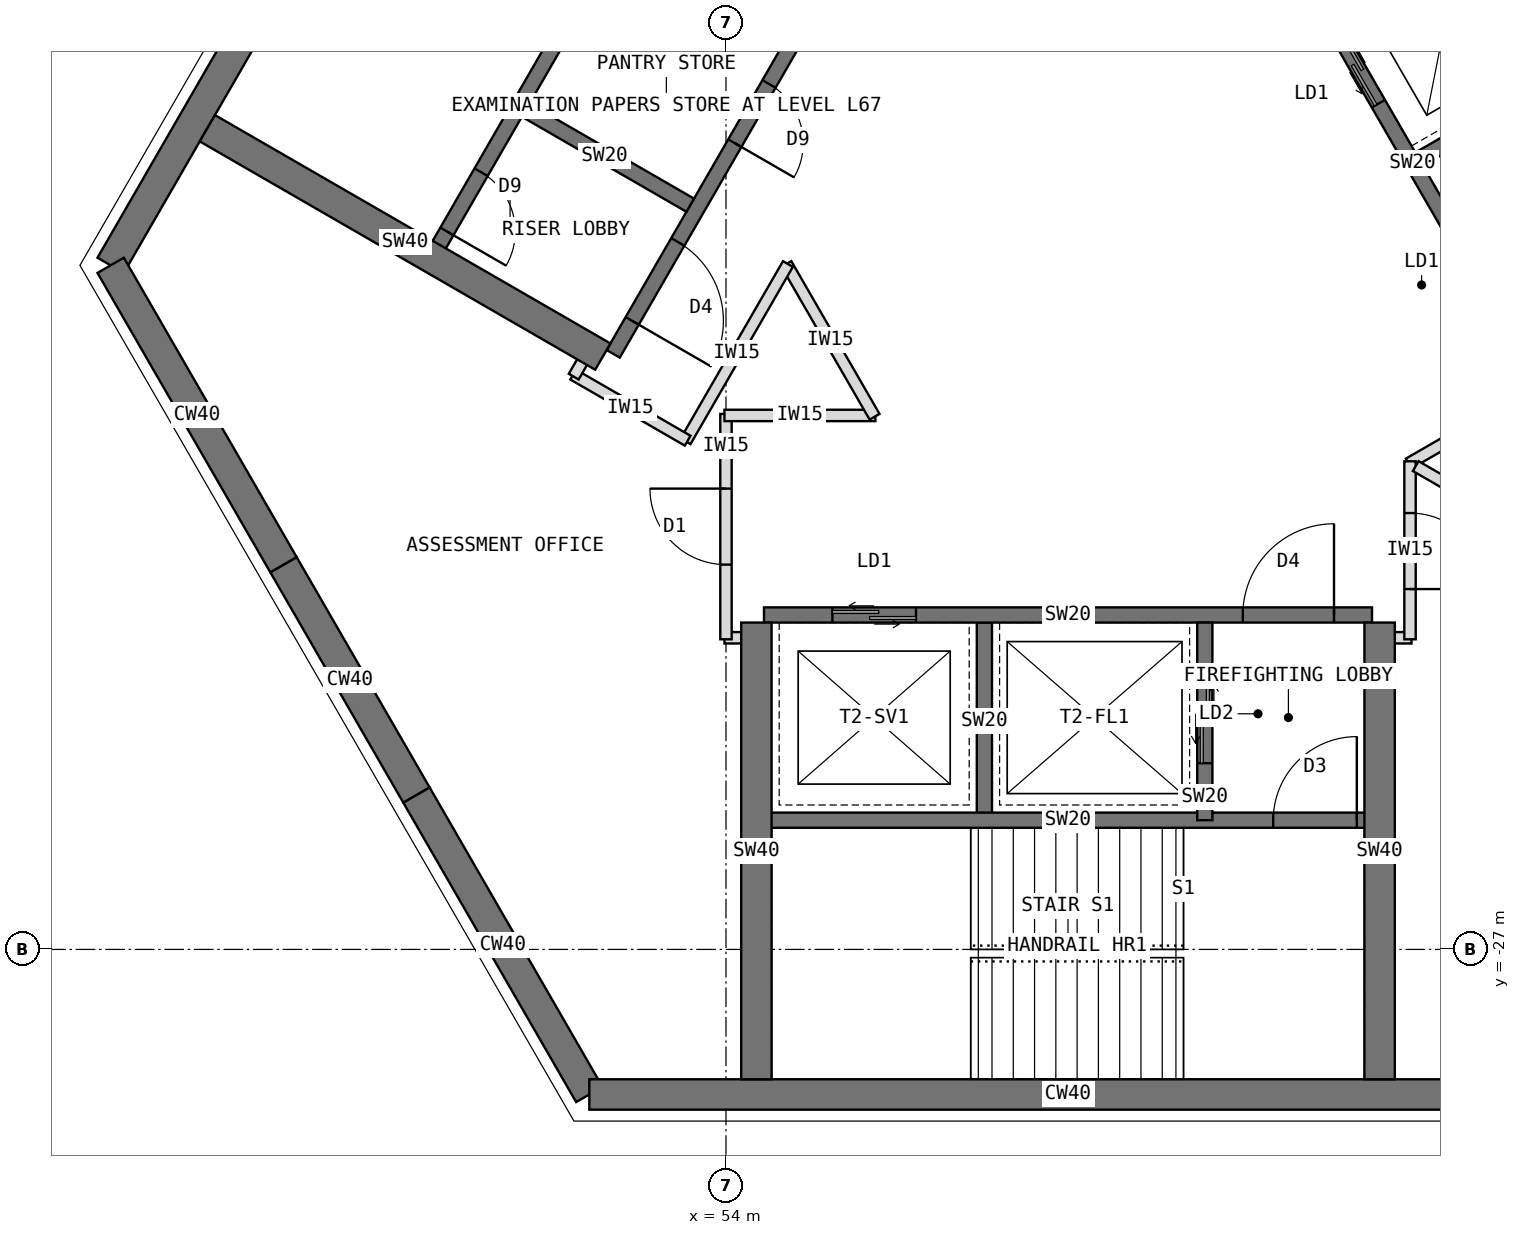
"""IFC4 building model, lengths in metres.
Left out: names, types, materials, properties, quantities, classifications, styles, units other than length and angle.
Written with IfcOpenShell. Run it as: python <this file> out.ifc"""

import sys

from ifc_helpers import new_model, si_unit, direction, frame, frame_2d, origin, place, context, subcontext, project, spatial, rectangle, extrude, element, fill, save


model = new_model("IFC4")
c1 = context("Model", 3, precision=1e-05, world=origin(), true_north=direction((0.0, 1.0)))
c2 = subcontext(c1, "Body", "Model", "MODEL_VIEW")
j1 = project(units=[si_unit("LENGTHUNIT", "METRE"), si_unit("PLANEANGLEUNIT", "RADIAN")], contexts=[c1])
p1 = place(None, origin())
s1 = spatial("IfcSite", under=j1, at=p1, CompositionType="ELEMENT")
p2 = place(p1, origin())
s2 = spatial("IfcBuilding", under=s1, at=p2, CompositionType="ELEMENT")
p3 = place(p2, frame((0.0, 0.0, 267.5)))
s3 = spatial("IfcBuildingStorey", under=s2, at=p3, CompositionType="ELEMENT", Elevation=267.5)
p4 = place(p3, frame((52.202, -7.092, 0.0), z_axis=(0.0, 0.0, 1.0), x_axis=(-0.500005998175, -0.866021940709, 0.0)))
e1 = element("IfcWall", 1, at=p4, inside=s3, PredefinedType="SHEAR", context=c2, shape_type="SweptSolid", body=[
    extrude(rectangle(XDim=12.596, YDim=0.4, at=frame_2d((6.298, 0.0))), origin(), (0.0, 0.0, 1.0), 4.0),
])
p5 = place(p3, frame((45.904, -18.0, 0.0), z_axis=(0.0, 0.0, 1.0), x_axis=(0.500024481964, -0.866011268655, 0.0)))
e2 = element("IfcWall", 2, at=p5, inside=s3, PredefinedType="SHEAR", context=c2, shape_type="SweptSolid", body=[
    extrude(rectangle(XDim=4.548, YDim=0.4, at=frame_2d((2.274, 0.0))), origin(), (0.0, 0.0, 1.0), 4.0),
])
p6 = place(p3, frame((48.178, -21.939, 0.0), z_axis=(0.0, 0.0, 1.0), x_axis=(0.500010275428, -0.866019471182, 0.0)))
e3 = element("IfcWall", 3, at=p6, inside=s3, PredefinedType="SHEAR", context=c2, shape_type="SweptSolid", body=[
    extrude(rectangle(XDim=3.5, YDim=0.4, at=frame_2d((1.75, 0.0))), origin(), (0.0, 0.0, 1.0), 4.0),
])
p7 = place(p3, frame((49.928, -24.97, 0.0), z_axis=(0.0, 0.0, 1.0), x_axis=(0.499984222037, -0.866034513004, 0.0)))
e4 = element("IfcWall", 4, at=p7, inside=s3, PredefinedType="SHEAR", context=c2, shape_type="SweptSolid", body=[
    extrude(rectangle(XDim=4.548, YDim=0.4, at=frame_2d((2.274, 0.0))), origin(), (0.0, 0.0, 1.0), 4.0),
])
p8 = place(p3, frame((52.202, -28.908, 0.0), z_axis=(0.0, 0.0, 1.0), x_axis=(1.0, 0.0, 0.0)))
e5 = element("IfcWall", 5, at=p8, inside=s3, PredefinedType="SHEAR", context=c2, shape_type="SweptSolid", body=[
    extrude(rectangle(XDim=12.596, YDim=0.4, at=frame_2d((6.298, 0.0))), origin(), (0.0, 0.0, 1.0), 4.0),
])
p9 = place(p3, frame((56.516, -12.236, 0.0), z_axis=(0.0, 0.0, 1.0), x_axis=(-0.49999894854, -0.866026010844, 0.0)))
e6 = element("IfcWall", 6, at=p9, inside=s3, PredefinedType="SHEAR", context=c2, shape_type="SweptSolid", body=[
    extrude(rectangle(XDim=8.0, YDim=0.2, at=frame_2d((4.0, 0.0))), origin(), (0.0, 0.0, 1.0), 4.0),
])
p10 = place(p9, frame((6.3, 0.0, 0.0)))
e7 = element("IfcOpeningElement", 7, at=p10, cuts=e6, PredefinedType="OPENING", context=c2, shape_type="SweptSolid", body=[
    extrude(rectangle(XDim=1.2, YDim=2.1, at=frame_2d((0.6, 1.05))), frame((0.0, 0.11, 0.0), z_axis=(0.0, -1.0, 0.0), x_axis=(1.0, 0.0, 0.0)), (0.0, 0.0, 1.0), 0.22),
])
p11 = place(p9, frame((1.0, 0.0, 0.0)))
e8 = element("IfcOpeningElement", 8, at=p11, cuts=e6, PredefinedType="OPENING", context=c2, shape_type="SweptSolid", body=[
    extrude(rectangle(XDim=0.9, YDim=2.1, at=frame_2d((0.45, 1.05))), frame((0.0, 0.11, 0.0), z_axis=(0.0, -1.0, 0.0), x_axis=(1.0, 0.0, 0.0)), (0.0, 0.0, 1.0), 0.22),
])
p12 = place(p9, frame((3.9, 0.0, 0.0)))
e9 = element("IfcOpeningElement", 9, at=p12, cuts=e6, PredefinedType="OPENING", context=c2, shape_type="SweptSolid", body=[
    extrude(rectangle(XDim=0.9, YDim=2.1, at=frame_2d((0.45, 1.05))), frame((0.0, 0.11, 0.0), z_axis=(0.0, -1.0, 0.0), x_axis=(1.0, 0.0, 0.0)), (0.0, 0.0, 1.0), 0.22),
])
p13 = place(p3, frame((53.53, -17.209, 0.0), z_axis=(0.0, 0.0, 1.0), x_axis=(-0.866062058628, 0.499936506574, 0.0)))
e10 = element("IfcWall", 10, at=p13, inside=s3, PredefinedType="SHEAR", context=c2, shape_type="SweptSolid", body=[
    extrude(rectangle(XDim=2.6, YDim=0.2, at=frame_2d((1.3, 0.0))), origin(), (0.0, 0.0, 1.0), 4.0),
])
p14 = place(p3, frame((54.178, -10.886, 0.0), z_axis=(0.0, 0.0, 1.0), x_axis=(-0.49999894854, -0.866026010844, 0.0)))
e11 = element("IfcWall", 11, at=p14, inside=s3, PredefinedType="SHEAR", context=c2, shape_type="SweptSolid", body=[
    extrude(rectangle(XDim=8.0, YDim=0.2, at=frame_2d((4.0, 0.0))), origin(), (0.0, 0.0, 1.0), 4.0),
])
p15 = place(p14, frame((6.8, 0.0, 0.0)))
e12 = element("IfcOpeningElement", 12, at=p15, cuts=e11, PredefinedType="OPENING", context=c2, shape_type="SweptSolid", body=[
    extrude(rectangle(XDim=0.9, YDim=2.1, at=frame_2d((0.45, 1.05))), frame((0.0, 0.11, 0.0), z_axis=(0.0, -1.0, 0.0), x_axis=(1.0, 0.0, 0.0)), (0.0, 0.0, 1.0), 0.22),
])
p16 = place(p3, frame((52.38, -19.201, 0.0), z_axis=(0.0, 0.0, 1.0), x_axis=(-0.866026570101, 0.499997979876, 0.0)))
e13 = element("IfcWall", 13, at=p16, inside=s3, PredefinedType="SHEAR", context=c2, shape_type="SweptSolid", body=[
    extrude(rectangle(XDim=6.008, YDim=0.4, at=frame_2d((3.004, 0.0))), origin(), (0.0, 0.0, 1.0), 4.0),
])
p17 = place(p3, frame((54.5, -22.6, 0.0), z_axis=(0.0, 0.0, 1.0), x_axis=(1.0, 0.0, 0.0)))
e14 = element("IfcWall", 14, at=p17, inside=s3, PredefinedType="SHEAR", context=c2, shape_type="SweptSolid", body=[
    extrude(rectangle(XDim=8.0, YDim=0.2, at=frame_2d((4.0, 0.0))), origin(), (0.0, 0.0, 1.0), 4.0),
])
p18 = place(p17, frame((6.3, 0.0, 0.0)))
e15 = element("IfcOpeningElement", 15, at=p18, cuts=e14, PredefinedType="OPENING", context=c2, shape_type="SweptSolid", body=[
    extrude(rectangle(XDim=1.2, YDim=2.1, at=frame_2d((0.6, 1.05))), frame((0.0, 0.11, 0.0), z_axis=(0.0, -1.0, 0.0), x_axis=(1.0, 0.0, 0.0)), (0.0, 0.0, 1.0), 0.22),
])
p19 = place(p17, frame((0.9, 0.0, 0.0)))
e16 = element("IfcOpeningElement", 16, at=p19, cuts=e14, PredefinedType="OPENING", context=c2, shape_type="SweptSolid", body=[
    extrude(rectangle(XDim=1.1, YDim=2.2, at=frame_2d((0.55, 1.1))), frame((0.0, 0.11, 0.0), z_axis=(0.0, -1.0, 0.0), x_axis=(1.0, 0.0, 0.0)), (0.0, 0.0, 1.0), 0.22),
])
p20 = place(p3, frame((57.4, -22.7, 0.0), z_axis=(0.0, 0.0, 1.0), x_axis=(0.0, -1.0, 0.0)))
e17 = element("IfcWall", 17, at=p20, inside=s3, PredefinedType="SHEAR", context=c2, shape_type="SweptSolid", body=[
    extrude(rectangle(XDim=2.6, YDim=0.2, at=frame_2d((1.3, 0.0))), origin(), (0.0, 0.0, 1.0), 4.0),
])
p21 = place(p3, frame((60.3, -22.7, 0.0), z_axis=(0.0, 0.0, 1.0), x_axis=(0.0, -1.0, 0.0)))
e18 = element("IfcWall", 18, at=p21, inside=s3, PredefinedType="SHEAR", context=c2, shape_type="SweptSolid", body=[
    extrude(rectangle(XDim=2.6, YDim=0.2, at=frame_2d((1.3, 0.0))), origin(), (0.0, 0.0, 1.0), 4.0),
])
p22 = place(p21, frame((0.55, 0.0, 0.0)))
e19 = element("IfcOpeningElement", 19, at=p22, cuts=e18, PredefinedType="OPENING", context=c2, shape_type="SweptSolid", body=[
    extrude(rectangle(XDim=1.3, YDim=2.2, at=frame_2d((0.65, 1.1))), frame((0.0, 0.11, 0.0), z_axis=(0.0, -1.0, 0.0), x_axis=(1.0, 0.0, 0.0)), (0.0, 0.0, 1.0), 0.22),
])
p23 = place(p3, frame((54.5, -25.3, 0.0), z_axis=(0.0, 0.0, 1.0), x_axis=(1.0, 0.0, 0.0)))
e20 = element("IfcWall", 20, at=p23, inside=s3, PredefinedType="SHEAR", context=c2, shape_type="SweptSolid", body=[
    extrude(rectangle(XDim=8.0, YDim=0.2, at=frame_2d((4.0, 0.0))), origin(), (0.0, 0.0, 1.0), 4.0),
])
p24 = place(p23, frame((6.7, 0.0, 0.0)))
e21 = element("IfcOpeningElement", 21, at=p24, cuts=e20, PredefinedType="OPENING", context=c2, shape_type="SweptSolid", body=[
    extrude(rectangle(XDim=1.1, YDim=2.1, at=frame_2d((0.55, 1.05))), frame((0.0, 0.11, 0.0), z_axis=(0.0, -1.0, 0.0), x_axis=(1.0, 0.0, 0.0)), (0.0, 0.0, 1.0), 0.22),
])
for number, where, z_axis, x_axis in (
    (22, (62.6, -22.7, 0.0), (0.0, 0.0, 1.0), (0.0, -1.0, 0.0)),
    (23, (54.4, -22.7, 0.0), (0.0, 0.0, 1.0), (0.0, -1.0, 0.0)),
):
    element("IfcWall", number, at=place(p3, frame(where, z_axis=z_axis, x_axis=x_axis)), inside=s3, PredefinedType="SHEAR", context=c2, shape_type="SweptSolid", body=[
        extrude(rectangle(XDim=6.008, YDim=0.4, at=frame_2d((3.004, 0.0))), origin(), (0.0, 0.0, 1.0), 4.0),
    ])
p25 = place(p3, frame((64.484, -19.164, 0.0), z_axis=(0.0, 0.0, 1.0), x_axis=(-0.49999894854, 0.866026010844, 0.0)))
e24 = element("IfcWall", 24, at=p25, inside=s3, PredefinedType="SHEAR", context=c2, shape_type="SweptSolid", body=[
    extrude(rectangle(XDim=8.0, YDim=0.2, at=frame_2d((4.0, 0.0))), origin(), (0.0, 0.0, 1.0), 4.0),
])
p26 = place(p25, frame((6.3, 0.0, 0.0)))
e25 = element("IfcOpeningElement", 25, at=p26, cuts=e24, PredefinedType="OPENING", context=c2, shape_type="SweptSolid", body=[
    extrude(rectangle(XDim=1.2, YDim=2.1, at=frame_2d((0.6, 1.05))), frame((0.0, 0.11, 0.0), z_axis=(0.0, -1.0, 0.0), x_axis=(1.0, 0.0, 0.0)), (0.0, 0.0, 1.0), 0.22),
])
p27 = place(p25, frame((0.9, 0.0, 0.0)))
e26 = element("IfcOpeningElement", 26, at=p27, cuts=e24, PredefinedType="OPENING", context=c2, shape_type="SweptSolid", body=[
    extrude(rectangle(XDim=1.1, YDim=2.2, at=frame_2d((0.55, 1.1))), frame((0.0, 0.11, 0.0), z_axis=(0.0, -1.0, 0.0), x_axis=(1.0, 0.0, 0.0)), (0.0, 0.0, 1.0), 0.22),
])
p28 = place(p25, frame((3.8, 0.0, 0.0)))
e27 = element("IfcOpeningElement", 27, at=p28, cuts=e24, PredefinedType="OPENING", context=c2, shape_type="SweptSolid", body=[
    extrude(rectangle(XDim=1.1, YDim=2.2, at=frame_2d((0.55, 1.1))), frame((0.0, 0.11, 0.0), z_axis=(0.0, -1.0, 0.0), x_axis=(1.0, 0.0, 0.0)), (0.0, 0.0, 1.0), 0.22),
])
p29 = place(p3, frame((63.12, -16.603, 0.0), z_axis=(0.0, 0.0, 1.0), x_axis=(0.866062058628, 0.499936506574, 0.0)))
e28 = element("IfcWall", 28, at=p29, inside=s3, PredefinedType="SHEAR", context=c2, shape_type="SweptSolid", body=[
    extrude(rectangle(XDim=2.6, YDim=0.2, at=frame_2d((1.3, 0.0))), origin(), (0.0, 0.0, 1.0), 4.0),
])
p30 = place(p3, frame((66.822, -17.814, 0.0), z_axis=(0.0, 0.0, 1.0), x_axis=(-0.49999894854, 0.866026010844, 0.0)))
e29 = element("IfcWall", 29, at=p30, inside=s3, PredefinedType="SHEAR", context=c2, shape_type="SweptSolid", body=[
    extrude(rectangle(XDim=8.0, YDim=0.2, at=frame_2d((4.0, 0.0))), origin(), (0.0, 0.0, 1.0), 4.0),
])
p31 = place(p30, frame((6.7, 0.0, 0.0)))
e30 = element("IfcOpeningElement", 30, at=p31, cuts=e29, PredefinedType="OPENING", context=c2, shape_type="SweptSolid", body=[
    extrude(rectangle(XDim=1.1, YDim=2.1, at=frame_2d((0.55, 1.05))), frame((0.0, 0.11, 0.0), z_axis=(0.0, -1.0, 0.0), x_axis=(1.0, 0.0, 0.0)), (0.0, 0.0, 1.0), 0.22),
])
for number, where, z_axis, x_axis in (
    (31, (63.02, -22.9, 0.0), (0.0, 0.0, 1.0), (-1.0, 0.0, 0.0)),
    (32, (54.41, -22.9, 0.0), (0.0, 0.0, 1.0), (-1.0, 0.0, 0.0)),
):
    element("IfcWall", number, at=place(p3, frame(where, z_axis=z_axis, x_axis=x_axis)), inside=s3, PredefinedType="PARTITIONING", context=c2, shape_type="SweptSolid", body=[
        extrude(rectangle(XDim=0.43, YDim=0.15, at=frame_2d((0.215, 0.0))), origin(), (0.0, 0.0, 1.0), 3.8),
    ])
p32 = place(p3, frame((54.0, -22.92, 0.0), z_axis=(0.0, 0.0, 1.0), x_axis=(0.0, 1.0, 0.0)))
e33 = element("IfcWall", 33, at=p32, inside=s3, PredefinedType="PARTITIONING", context=c2, shape_type="SweptSolid", body=[
    extrude(rectangle(XDim=2.965, YDim=0.15, at=frame_2d((1.482, 0.0))), origin(), (0.0, 0.0, 1.0), 3.8),
])
p33 = place(p32, frame((0.982, 0.0, 0.0)))
e34 = element("IfcOpeningElement", 34, at=p33, cuts=e33, PredefinedType="OPENING", context=c2, shape_type="SweptSolid", body=[
    extrude(rectangle(XDim=1.0, YDim=2.1, at=frame_2d((0.5, 1.05))), frame((0.0, 0.085, 0.0), z_axis=(0.0, -1.0, 0.0), x_axis=(1.0, 0.0, 0.0)), (0.0, 0.0, 1.0), 0.17),
])
p34 = place(p3, frame((53.98, -19.975, 0.0), z_axis=(0.0, 0.0, 1.0), x_axis=(1.0, 0.0, 0.0)))
e35 = element("IfcWall", 35, at=p34, inside=s3, PredefinedType="PARTITIONING", context=c2, shape_type="SweptSolid", body=[
    extrude(rectangle(XDim=1.985, YDim=0.15, at=frame_2d((0.993, 0.0))), origin(), (0.0, 0.0, 1.0), 3.8),
])
p35 = place(p3, frame((55.955, -19.992, 0.0), z_axis=(0.0, 0.0, 1.0), x_axis=(-0.499941024108, 0.866059450854, 0.0)))
e36 = element("IfcWall", 36, at=p35, inside=s3, PredefinedType="PARTITIONING", context=c2, shape_type="SweptSolid", body=[
    extrude(rectangle(XDim=2.321, YDim=0.15, at=frame_2d((1.16, 0.0))), origin(), (0.0, 0.0, 1.0), 3.8),
])
p36 = place(p3, frame((54.815, -17.983, 0.0), z_axis=(0.0, 0.0, 1.0), x_axis=(-0.499981473571, -0.866036099759, 0.0)))
e37 = element("IfcWall", 37, at=p36, inside=s3, PredefinedType="PARTITIONING", context=c2, shape_type="SweptSolid", body=[
    extrude(rectangle(XDim=2.692, YDim=0.15, at=frame_2d((1.346, 0.0))), origin(), (0.0, 0.0, 1.0), 3.8),
])
p37 = place(p3, frame((53.496, -20.307, 0.0), z_axis=(0.0, 0.0, 1.0), x_axis=(-0.865989304205, 0.500062521093, 0.0)))
e38 = element("IfcWall", 38, at=p37, inside=s3, PredefinedType="PARTITIONING", context=c2, shape_type="SweptSolid", body=[
    extrude(rectangle(XDim=1.74, YDim=0.15, at=frame_2d((0.87, 0.0))), origin(), (0.0, 0.0, 1.0), 3.8),
])
p38 = place(p3, frame((51.997, -19.464, 0.0), z_axis=(0.0, 0.0, 1.0), x_axis=(0.499804398801, 0.866138304741, 0.0)))
e39 = element("IfcWall", 39, at=p38, inside=s3, PredefinedType="PARTITIONING", context=c2, shape_type="SweptSolid", body=[
    extrude(rectangle(XDim=0.43, YDim=0.15, at=frame_2d((0.215, 0.0))), origin(), (0.0, 0.0, 1.0), 3.8),
])
p39 = place(p3, frame((65.011, -19.437, 0.0), z_axis=(0.0, 0.0, 1.0), x_axis=(-0.865982457891, -0.500074377092, 0.0)))
e40 = element("IfcWall", 40, at=p39, inside=s3, PredefinedType="PARTITIONING", context=c2, shape_type="SweptSolid", body=[
    extrude(rectangle(XDim=2.342, YDim=0.15, at=frame_2d((1.171, 0.0))), origin(), (0.0, 0.0, 1.0), 3.8),
])
p40 = place(p39, frame((0.661, 0.0, 0.0)))
e41 = element("IfcOpeningElement", 41, at=p40, cuts=e40, PredefinedType="OPENING", context=c2, shape_type="SweptSolid", body=[
    extrude(rectangle(XDim=1.0, YDim=2.1, at=frame_2d((0.5, 1.05))), frame((0.0, 0.085, 0.0), z_axis=(0.0, -1.0, 0.0), x_axis=(1.0, 0.0, 0.0)), (0.0, 0.0, 1.0), 0.17),
])
p41 = place(p3, frame((63.0, -20.578, 0.0), z_axis=(0.0, 0.0, 1.0), x_axis=(0.0, -1.0, 0.0)))
e42 = element("IfcWall", 42, at=p41, inside=s3, PredefinedType="PARTITIONING", context=c2, shape_type="SweptSolid", body=[
    extrude(rectangle(XDim=2.342, YDim=0.15, at=frame_2d((1.171, 0.0))), origin(), (0.0, 0.0, 1.0), 3.8),
])
p42 = place(p41, frame((0.681, 0.0, 0.0)))
e43 = element("IfcOpeningElement", 43, at=p42, cuts=e42, PredefinedType="OPENING", context=c2, shape_type="SweptSolid", body=[
    extrude(rectangle(XDim=1.0, YDim=2.1, at=frame_2d((0.5, 1.05))), frame((0.0, 0.085, 0.0), z_axis=(0.0, -1.0, 0.0), x_axis=(1.0, 0.0, 0.0)), (0.0, 0.0, 1.0), 0.17),
])
p43 = place(p3, frame((63.075, -20.641, 0.0), z_axis=(0.0, 0.0, 1.0), x_axis=(0.866019232626, -0.500010688608, 0.0)))
e44 = element("IfcWall", 44, at=p43, inside=s3, PredefinedType="PARTITIONING", context=c2, shape_type="SweptSolid", body=[
    extrude(rectangle(XDim=5.426, YDim=0.15, at=frame_2d((2.713, 0.0))), origin(), (0.0, 0.0, 1.0), 3.8),
])
p44 = place(p10, origin())
e45 = element("IfcDoor", 45, at=p44, inside=s3, OperationType="SINGLE_SWING_RIGHT", PredefinedType="DOOR", context=c2, shape_type="SweptSolid", body=[
    extrude(rectangle(XDim=1.2, YDim=2.1, at=frame_2d((0.6, 1.05))), frame((0.0, 0.025, 0.0), z_axis=(0.0, -1.0, 0.0), x_axis=(1.0, 0.0, 0.0)), (0.0, 0.0, 1.0), 0.05),
])
fill(e7, e45)
p45 = place(p15, origin())
e46 = element("IfcDoor", 46, at=p45, inside=s3, OperationType="SINGLE_SWING_RIGHT", PredefinedType="DOOR", context=c2, shape_type="SweptSolid", body=[
    extrude(rectangle(XDim=0.9, YDim=2.1, at=frame_2d((0.45, 1.05))), frame((0.0, 0.025, 0.0), z_axis=(0.0, -1.0, 0.0), x_axis=(1.0, 0.0, 0.0)), (0.0, 0.0, 1.0), 0.05),
])
fill(e12, e46)
p46 = place(p18, origin())
e47 = element("IfcDoor", 47, at=p46, inside=s3, OperationType="SINGLE_SWING_RIGHT", PredefinedType="DOOR", context=c2, shape_type="SweptSolid", body=[
    extrude(rectangle(XDim=1.2, YDim=2.1, at=frame_2d((0.6, 1.05))), frame((0.0, 0.025, 0.0), z_axis=(0.0, -1.0, 0.0), x_axis=(1.0, 0.0, 0.0)), (0.0, 0.0, 1.0), 0.05),
])
fill(e15, e47)
p47 = place(p22, origin())
e48 = element("IfcDoor", 48, at=p47, inside=s3, OperationType="DOUBLE_DOOR_SLIDING", PredefinedType="DOOR", context=c2, shape_type="SweptSolid", body=[
    extrude(rectangle(XDim=1.3, YDim=2.2, at=frame_2d((0.65, 1.1))), frame((0.0, 0.025, 0.0), z_axis=(0.0, -1.0, 0.0), x_axis=(1.0, 0.0, 0.0)), (0.0, 0.0, 1.0), 0.05),
])
fill(e19, e48)
p48 = place(p19, origin())
e49 = element("IfcDoor", 49, at=p48, inside=s3, OperationType="DOUBLE_DOOR_SLIDING", PredefinedType="DOOR", context=c2, shape_type="SweptSolid", body=[
    extrude(rectangle(XDim=1.1, YDim=2.2, at=frame_2d((0.55, 1.1))), frame((0.0, 0.025, 0.0), z_axis=(0.0, -1.0, 0.0), x_axis=(1.0, 0.0, 0.0)), (0.0, 0.0, 1.0), 0.05),
])
fill(e16, e49)
p49 = place(p24, origin())
e50 = element("IfcDoor", 50, at=p49, inside=s3, OperationType="SINGLE_SWING_RIGHT", PredefinedType="DOOR", context=c2, shape_type="SweptSolid", body=[
    extrude(rectangle(XDim=1.1, YDim=2.1, at=frame_2d((0.55, 1.05))), frame((0.0, 0.025, 0.0), z_axis=(0.0, -1.0, 0.0), x_axis=(1.0, 0.0, 0.0)), (0.0, 0.0, 1.0), 0.05),
])
fill(e21, e50)
p50 = place(p28, origin())
e51 = element("IfcDoor", 51, at=p50, inside=s3, OperationType="DOUBLE_DOOR_SLIDING", PredefinedType="DOOR", context=c2, shape_type="SweptSolid", body=[
    extrude(rectangle(XDim=1.1, YDim=2.2, at=frame_2d((0.55, 1.1))), frame((0.0, 0.025, 0.0), z_axis=(0.0, -1.0, 0.0), x_axis=(1.0, 0.0, 0.0)), (0.0, 0.0, 1.0), 0.05),
])
fill(e27, e51)
p51 = place(p33, origin())
e52 = element("IfcDoor", 52, at=p51, inside=s3, OperationType="SINGLE_SWING_RIGHT", PredefinedType="DOOR", context=c2, shape_type="SweptSolid", body=[
    extrude(rectangle(XDim=1.0, YDim=2.1, at=frame_2d((0.5, 1.05))), frame((0.0, 0.025, 0.0), z_axis=(0.0, -1.0, 0.0), x_axis=(1.0, 0.0, 0.0)), (0.0, 0.0, 1.0), 0.05),
])
fill(e34, e52)
p52 = place(p42, origin())
e53 = element("IfcDoor", 53, at=p52, inside=s3, OperationType="SINGLE_SWING_RIGHT", PredefinedType="DOOR", context=c2, shape_type="SweptSolid", body=[
    extrude(rectangle(XDim=1.0, YDim=2.1, at=frame_2d((0.5, 1.05))), frame((0.0, 0.025, 0.0), z_axis=(0.0, -1.0, 0.0), x_axis=(1.0, 0.0, 0.0)), (0.0, 0.0, 1.0), 0.05),
])
fill(e43, e53)
p53 = place(p12, origin())
e54 = element("IfcDoor", 54, at=p53, inside=s3, OperationType="SINGLE_SWING_RIGHT", PredefinedType="DOOR", context=c2, shape_type="SweptSolid", body=[
    extrude(rectangle(XDim=0.9, YDim=2.1, at=frame_2d((0.45, 1.05))), frame((0.0, 0.025, 0.0), z_axis=(0.0, -1.0, 0.0), x_axis=(1.0, 0.0, 0.0)), (0.0, 0.0, 1.0), 0.05),
])
fill(e9, e54)
save(model, sys.argv[1])
